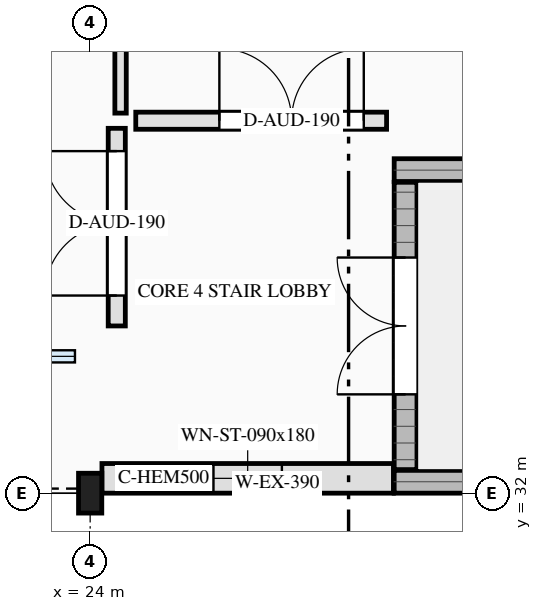
"""IFC4 building model, lengths in metres.
Left out: names, types, materials, properties, quantities, classifications, styles, units other than length and angle.
Written with IfcOpenShell. Run it as: python <this file> out.ifc"""

import sys

from ifc_helpers import new_model, si_unit, direction, frame, frame_2d, origin, origin_2d, place, context, subcontext, project, spatial, rectangle, i_section, extrude, element, fill, save


model = new_model("IFC4")
c1 = context("Model", 3, precision=1e-05, world=origin(), true_north=direction((0.0, 1.0)))
c2 = subcontext(c1, "Body", "Model", "MODEL_VIEW")
j1 = project(units=[si_unit("LENGTHUNIT", "METRE"), si_unit("PLANEANGLEUNIT", "RADIAN")], contexts=[c1])
p1 = place(None, origin())
s1 = spatial("IfcSite", under=j1, at=p1, CompositionType="ELEMENT")
p2 = place(p1, origin())
s2 = spatial("IfcBuilding", under=s1, at=p2, CompositionType="ELEMENT")
p3 = place(p2, frame((0.0, 0.0, 17.6)))
s3 = spatial("IfcBuildingStorey", under=s2, at=p3, CompositionType="ELEMENT", Elevation=17.6)
for number, where, z_axis, x_axis in (
    (1, (28.0, 32.15, 0.0), (0.0, 0.0, 1.0), (1.0, 0.0, 0.0)),
    (2, (28.0, 36.25, 0.0), (0.0, 0.0, 1.0), (1.0, 0.0, 0.0)),
):
    element("IfcWall", number, at=place(p3, frame(where, z_axis=z_axis, x_axis=x_axis)), inside=s3, PredefinedType="SHEAR", context=c2, shape_type="SweptSolid", body=[
        extrude(rectangle(XDim=10.0, YDim=0.3, at=frame_2d((5.0, 0.0))), origin(), (0.0, 0.0, 1.0), 4.2),
    ])
p4 = place(p3, frame((28.15, 32.31, 0.0), z_axis=(0.0, 0.0, 1.0), x_axis=(0.0, 1.0, 0.0)))
e3 = element("IfcWall", 3, at=p4, inside=s3, PredefinedType="SHEAR", context=c2, shape_type="SweptSolid", body=[
    extrude(rectangle(XDim=3.78, YDim=0.3, at=frame_2d((1.89, 0.0))), origin(), (0.0, 0.0, 1.0), 4.2),
])
p5 = place(p4, frame((0.99, 0.0, 0.0)))
e4 = element("IfcOpeningElement", 4, at=p5, cuts=e3, PredefinedType="OPENING", context=c2, shape_type="SweptSolid", body=[
    extrude(rectangle(XDim=1.8, YDim=2.2, at=frame_2d((0.9, 1.1))), frame((0.0, 0.16, 0.0), z_axis=(0.0, -1.0, 0.0), x_axis=(1.0, 0.0, 0.0)), (0.0, 0.0, 1.0), 0.32),
])
p6 = place(p3, frame((24.0, 32.0, 0.0), z_axis=(0.0, 0.0, 1.0), x_axis=(1.0, 0.0, 0.0)))
e5 = element("IfcColumn", 5, at=p6, inside=s3, PredefinedType="COLUMN", context=c2, shape_type="SweptSolid", body=[
    extrude(i_section(OverallWidth=0.306, OverallDepth=0.524, WebThickness=0.021, FlangeThickness=0.04, FilletRadius=0.027, at=origin_2d()), origin(), (0.0, 0.0, 1.0), 4.2),
])
p7 = place(p3, frame((27.99, 32.195, 0.0), z_axis=(0.0, 0.0, 1.0), x_axis=(-1.0, 0.0, 0.0)))
e6 = element("IfcWall", 6, at=p7, inside=s3, PredefinedType="SOLIDWALL", context=c2, shape_type="SweptSolid", body=[
    extrude(rectangle(XDim=3.835, YDim=0.39, at=frame_2d((1.917, 0.0))), origin(), (0.0, 0.0, 1.0), 3.505),
])
p8 = place(p7, frame((1.468, 0.0, 0.85)))
e7 = element("IfcOpeningElement", 7, at=p8, cuts=e6, PredefinedType="OPENING", context=c2, shape_type="SweptSolid", body=[
    extrude(rectangle(XDim=0.9, YDim=1.8, at=frame_2d((0.45, 0.9))), frame((0.0, 0.205, 0.0), z_axis=(0.0, -1.0, 0.0), x_axis=(1.0, 0.0, 0.0)), (0.0, 0.0, 1.0), 0.41),
])
p9 = place(p3, frame((24.6, 36.9, 0.0), z_axis=(0.0, 0.0, 1.0), x_axis=(1.0, 0.0, 0.0)))
e8 = element("IfcWall", 8, at=p9, inside=s3, PredefinedType="SOLIDWALL", context=c2, shape_type="SweptSolid", body=[
    extrude(rectangle(XDim=3.3, YDim=0.225, at=frame_2d((1.65, 0.0))), origin(), (0.0, 0.0, 1.0), 3.96),
])
p10 = place(p9, frame((1.1, 0.0, 0.0)))
e9 = element("IfcOpeningElement", 9, at=p10, cuts=e8, PredefinedType="OPENING", context=c2, shape_type="SweptSolid", body=[
    extrude(rectangle(XDim=1.9, YDim=2.35, at=frame_2d((0.95, 1.175))), frame((0.0, 0.123, 0.0), z_axis=(0.0, -1.0, 0.0), x_axis=(1.0, 0.0, 0.0)), (0.0, 0.0, 1.0), 0.245),
])
p11 = place(p3, frame((24.35, 34.2, 0.0), z_axis=(0.0, 0.0, 1.0), x_axis=(0.0, 1.0, 0.0)))
e10 = element("IfcWall", 10, at=p11, inside=s3, PredefinedType="SOLIDWALL", context=c2, shape_type="SweptSolid", body=[
    extrude(rectangle(XDim=2.6, YDim=0.225, at=frame_2d((1.3, 0.0))), origin(), (0.0, 0.0, 1.0), 3.96),
])
p12 = place(p11, frame((0.4, 0.0, 0.0)))
e11 = element("IfcOpeningElement", 11, at=p12, cuts=e10, PredefinedType="OPENING", context=c2, shape_type="SweptSolid", body=[
    extrude(rectangle(XDim=1.9, YDim=2.35, at=frame_2d((0.95, 1.175))), frame((0.0, 0.123, 0.0), z_axis=(0.0, -1.0, 0.0), x_axis=(1.0, 0.0, 0.0)), (0.0, 0.0, 1.0), 0.245),
])
p13 = place(p3, frame((24.4, 37.0, 0.0), z_axis=(0.0, 0.0, 1.0), x_axis=(0.0, 1.0, 0.0)))
e12 = element("IfcWall", 12, at=p13, inside=s3, PredefinedType="PARTITIONING", context=c2, shape_type="SweptSolid", body=[
    extrude(rectangle(XDim=14.8, YDim=0.15, at=frame_2d((7.4, 0.0))), origin(), (0.0, 0.0, 1.0), 3.96),
])
p14 = place(p13, frame((11.549, 0.0, 0.0)))
e13 = element("IfcOpeningElement", 13, at=p14, cuts=e12, PredefinedType="OPENING", context=c2, shape_type="SweptSolid", body=[
    extrude(rectangle(XDim=2.6, YDim=2.9, at=frame_2d((1.3, 1.45))), frame((0.0, 0.085, 0.0), z_axis=(0.0, -1.0, 0.0), x_axis=(1.0, 0.0, 0.0)), (0.0, 0.0, 1.0), 0.17),
])
p15 = place(p8, origin())
e14 = element("IfcWindow", 14, at=p15, inside=s3, PartitioningType="SINGLE_PANEL", PredefinedType="WINDOW", context=c2, shape_type="SweptSolid", body=[
    extrude(rectangle(XDim=0.9, YDim=1.8, at=frame_2d((0.45, 0.9))), frame((0.0, 0.03, 0.0), z_axis=(0.0, -1.0, 0.0), x_axis=(1.0, 0.0, 0.0)), (0.0, 0.0, 1.0), 0.06),
])
fill(e7, e14)
p16 = place(p5, origin())
e15 = element("IfcDoor", 15, at=p16, inside=s3, OperationType="DOUBLE_DOOR_SINGLE_SWING", PredefinedType="DOOR", context=c2, shape_type="SweptSolid", body=[
    extrude(rectangle(XDim=1.8, YDim=2.2, at=frame_2d((0.9, 1.1))), frame((0.0, 0.025, 0.0), z_axis=(0.0, -1.0, 0.0), x_axis=(1.0, 0.0, 0.0)), (0.0, 0.0, 1.0), 0.05),
])
fill(e4, e15)
p17 = place(p10, origin())
e16 = element("IfcDoor", 16, at=p17, inside=s3, OperationType="DOUBLE_DOOR_SINGLE_SWING", PredefinedType="DOOR", context=c2, shape_type="SweptSolid", body=[
    extrude(rectangle(XDim=1.9, YDim=2.35, at=frame_2d((0.95, 1.175))), frame((0.0, 0.025, 0.0), z_axis=(0.0, -1.0, 0.0), x_axis=(1.0, 0.0, 0.0)), (0.0, 0.0, 1.0), 0.05),
])
fill(e9, e16)
p18 = place(p12, origin())
e17 = element("IfcDoor", 17, at=p18, inside=s3, OperationType="DOUBLE_DOOR_SINGLE_SWING", PredefinedType="DOOR", context=c2, shape_type="SweptSolid", body=[
    extrude(rectangle(XDim=1.9, YDim=2.35, at=frame_2d((0.95, 1.175))), frame((0.0, 0.025, 0.0), z_axis=(0.0, -1.0, 0.0), x_axis=(1.0, 0.0, 0.0)), (0.0, 0.0, 1.0), 0.05),
])
fill(e11, e17)
save(model, sys.argv[1])
